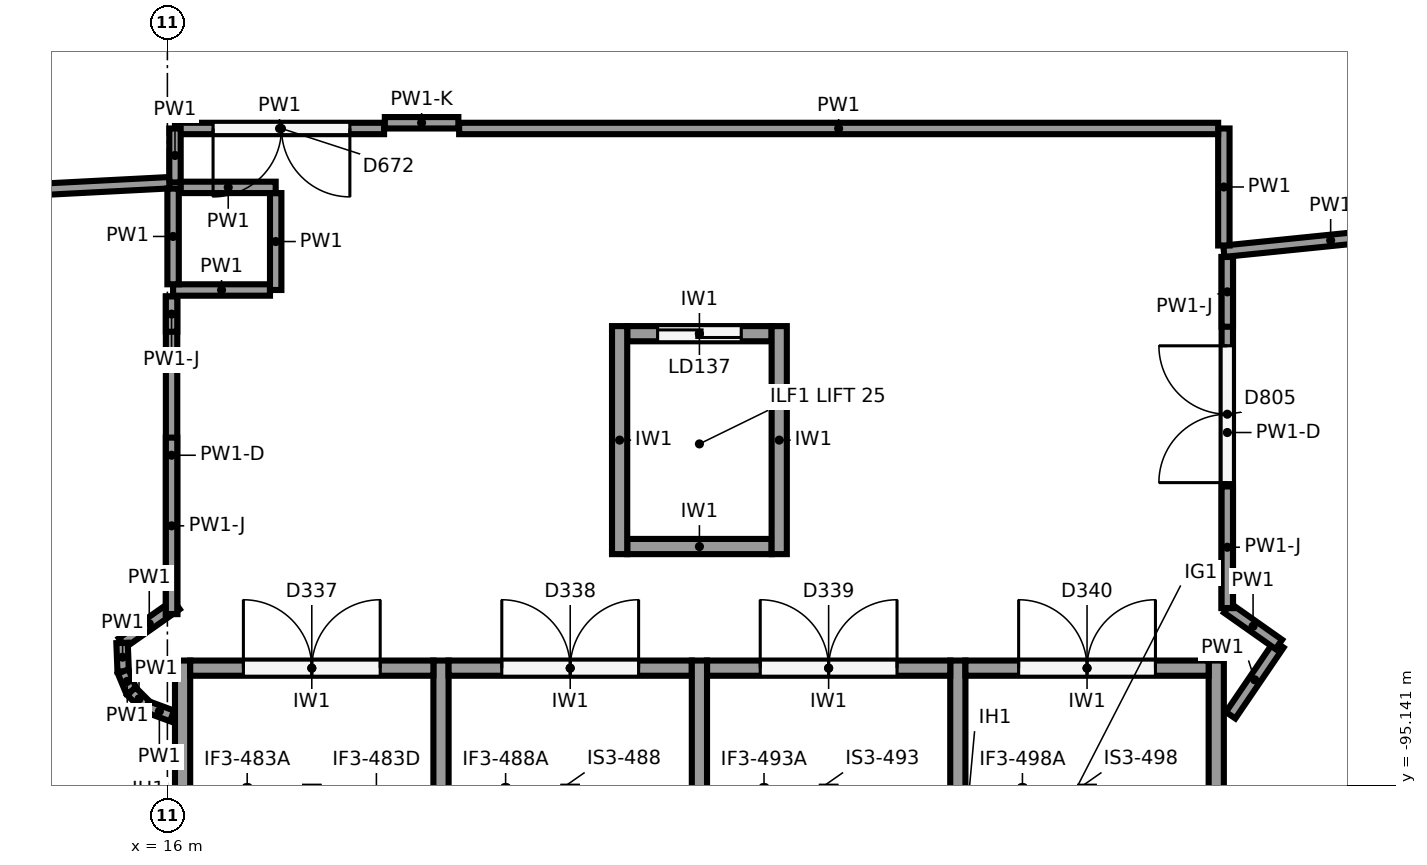
"""IFC4 building model, lengths in metres.
Left out: names, types, materials, properties, quantities, classifications, styles, units other than length and angle.
Written with IfcOpenShell. Run it as: python <this file> out.ifc"""

import sys

from ifc_helpers import new_model, si_unit, direction, frame, frame_2d, origin, origin_2d, place, context, subcontext, project, spatial, rectangle, circle, extrude, element, fill, save


model = new_model("IFC4")
c1 = context("Model", 3, precision=1e-05, world=origin(), true_north=direction((0.0, 1.0)))
c2 = subcontext(c1, "Body", "Model", "MODEL_VIEW")
j1 = project(units=[si_unit("LENGTHUNIT", "METRE"), si_unit("PLANEANGLEUNIT", "RADIAN")], contexts=[c1])
p1 = place(None, origin())
s1 = spatial("IfcSite", under=j1, at=p1, CompositionType="ELEMENT")
p2 = place(p1, origin())
s2 = spatial("IfcBuilding", under=s1, at=p2, CompositionType="ELEMENT")
p3 = place(p2, frame((0.0, 0.0, 6.5)))
s3 = spatial("IfcBuildingStorey", under=s2, at=p3, CompositionType="ELEMENT", Elevation=6.5)
p4 = place(p3, frame((19.119, -85.698, 0.0), z_axis=(0.0, 0.0, 1.0), x_axis=(1.0, 0.0, 0.0)))
e1 = element("IfcColumn", 1, at=p4, inside=s3, PredefinedType="COLUMN", context=c2, shape_type="SweptSolid", body=[
    extrude(circle(Radius=0.4, at=origin_2d()), origin(), (0.0, 0.0, 1.0), 5.5),
])
p5 = place(p3, frame((19.627, -89.904, 0.0), z_axis=(0.0, 0.0, 1.0), x_axis=(1.0, 0.0, 0.0)))
e2 = element("IfcColumn", 2, at=p5, inside=s3, PredefinedType="COLUMN", context=c2, shape_type="SweptSolid", body=[
    extrude(circle(Radius=0.55, at=origin_2d()), origin(), (0.0, 0.0, 1.0), 5.5),
])
p6 = place(p3, frame((31.737, -85.377, 0.0), z_axis=(0.0, 0.0, 1.0), x_axis=(1.0, 0.0, 0.0)))
e3 = element("IfcColumn", 3, at=p6, inside=s3, PredefinedType="COLUMN", context=c2, shape_type="SweptSolid", body=[
    extrude(circle(Radius=0.4, at=origin_2d()), origin(), (0.0, 0.0, 1.0), 5.5),
])
for number, where, z_axis, x_axis in (
    (4, (16.2, -102.3, 0.0), (0.0, 0.0, 1.0), (0.0, 1.0, 0.0)),
    (5, (23.0, -102.3, 0.0), (0.0, 0.0, 1.0), (0.0, 1.0, 0.0)),
    (6, (29.8, -102.3, 0.0), (0.0, 0.0, 1.0), (0.0, 1.0, 0.0)),
    (7, (19.6, -102.3, 0.0), (0.0, 0.0, 1.0), (0.0, 1.0, 0.0)),
    (8, (26.4, -102.3, 0.0), (0.0, 0.0, 1.0), (0.0, 1.0, 0.0)),
):
    element("IfcWall", number, at=place(p3, frame(where, z_axis=z_axis, x_axis=x_axis)), inside=s3, PredefinedType="SHEAR", context=c2, shape_type="SweptSolid", body=[
        extrude(rectangle(XDim=8.8, YDim=0.2, at=frame_2d((4.4, 0.0))), origin(), (0.0, 0.0, 1.0), 5.15),
    ])
p7 = place(p3, frame((16.3, -93.6, 0.0), z_axis=(0.0, 0.0, 1.0), x_axis=(1.0, 0.0, 0.0)))
e9 = element("IfcWall", 9, at=p7, inside=s3, PredefinedType="SHEAR", context=c2, shape_type="SweptSolid", body=[
    extrude(rectangle(XDim=3.2, YDim=0.2, at=frame_2d((1.6, 0.0))), origin(), (0.0, 0.0, 1.0), 5.15),
])
p8 = place(p7, frame((0.7, 0.0, 0.0)))
e10 = element("IfcOpeningElement", 10, at=p8, cuts=e9, PredefinedType="OPENING", context=c2, shape_type="SweptSolid", body=[
    extrude(rectangle(XDim=1.8, YDim=2.1, at=frame_2d((0.9, 1.05))), frame((0.0, 0.11, 0.0), z_axis=(0.0, -1.0, 0.0), x_axis=(1.0, 0.0, 0.0)), (0.0, 0.0, 1.0), 0.22),
])
p9 = place(p3, frame((19.7, -93.6, 0.0), z_axis=(0.0, 0.0, 1.0), x_axis=(1.0, 0.0, 0.0)))
e11 = element("IfcWall", 11, at=p9, inside=s3, PredefinedType="SHEAR", context=c2, shape_type="SweptSolid", body=[
    extrude(rectangle(XDim=3.2, YDim=0.2, at=frame_2d((1.6, 0.0))), origin(), (0.0, 0.0, 1.0), 5.15),
])
p10 = place(p9, frame((0.7, 0.0, 0.0)))
e12 = element("IfcOpeningElement", 12, at=p10, cuts=e11, PredefinedType="OPENING", context=c2, shape_type="SweptSolid", body=[
    extrude(rectangle(XDim=1.8, YDim=2.1, at=frame_2d((0.9, 1.05))), frame((0.0, 0.11, 0.0), z_axis=(0.0, -1.0, 0.0), x_axis=(1.0, 0.0, 0.0)), (0.0, 0.0, 1.0), 0.22),
])
p11 = place(p3, frame((23.1, -93.6, 0.0), z_axis=(0.0, 0.0, 1.0), x_axis=(1.0, 0.0, 0.0)))
e13 = element("IfcWall", 13, at=p11, inside=s3, PredefinedType="SHEAR", context=c2, shape_type="SweptSolid", body=[
    extrude(rectangle(XDim=3.2, YDim=0.2, at=frame_2d((1.6, 0.0))), origin(), (0.0, 0.0, 1.0), 5.15),
])
p12 = place(p11, frame((0.7, 0.0, 0.0)))
e14 = element("IfcOpeningElement", 14, at=p12, cuts=e13, PredefinedType="OPENING", context=c2, shape_type="SweptSolid", body=[
    extrude(rectangle(XDim=1.8, YDim=2.1, at=frame_2d((0.9, 1.05))), frame((0.0, 0.11, 0.0), z_axis=(0.0, -1.0, 0.0), x_axis=(1.0, 0.0, 0.0)), (0.0, 0.0, 1.0), 0.22),
])
p13 = place(p3, frame((26.5, -93.6, 0.0), z_axis=(0.0, 0.0, 1.0), x_axis=(1.0, 0.0, 0.0)))
e15 = element("IfcWall", 15, at=p13, inside=s3, PredefinedType="SHEAR", context=c2, shape_type="SweptSolid", body=[
    extrude(rectangle(XDim=3.2, YDim=0.2, at=frame_2d((1.6, 0.0))), origin(), (0.0, 0.0, 1.0), 5.15),
])
p14 = place(p13, frame((0.7, 0.0, 0.0)))
e16 = element("IfcOpeningElement", 16, at=p14, cuts=e15, PredefinedType="OPENING", context=c2, shape_type="SweptSolid", body=[
    extrude(rectangle(XDim=1.8, YDim=2.1, at=frame_2d((0.9, 1.05))), frame((0.0, 0.11, 0.0), z_axis=(0.0, -1.0, 0.0), x_axis=(1.0, 0.0, 0.0)), (0.0, 0.0, 1.0), 0.22),
])
for number, where, z_axis, x_axis in (
    (17, (21.95, -92.1, 0.0), (0.0, 0.0, 1.0), (0.0, 1.0, 0.0)),
    (18, (24.05, -92.1, 0.0), (0.0, 0.0, 1.0), (0.0, 1.0, 0.0)),
):
    element("IfcWall", number, at=place(p3, frame(where, z_axis=z_axis, x_axis=x_axis)), inside=s3, PredefinedType="SHEAR", context=c2, shape_type="SweptSolid", body=[
        extrude(rectangle(XDim=3.0, YDim=0.2, at=frame_2d((1.5, 0.0))), origin(), (0.0, 0.0, 1.0), 5.15),
    ])
p15 = place(p3, frame((22.05, -92.0, 0.0), z_axis=(0.0, 0.0, 1.0), x_axis=(1.0, 0.0, 0.0)))
e19 = element("IfcWall", 19, at=p15, inside=s3, PredefinedType="SHEAR", context=c2, shape_type="SweptSolid", body=[
    extrude(rectangle(XDim=1.9, YDim=0.2, at=frame_2d((0.95, 0.0))), origin(), (0.0, 0.0, 1.0), 5.15),
])
p16 = place(p3, frame((22.05, -89.2, 0.0), z_axis=(0.0, 0.0, 1.0), x_axis=(1.0, 0.0, 0.0)))
e20 = element("IfcWall", 20, at=p16, inside=s3, PredefinedType="SHEAR", context=c2, shape_type="SweptSolid", body=[
    extrude(rectangle(XDim=1.9, YDim=0.2, at=frame_2d((0.95, 0.0))), origin(), (0.0, 0.0, 1.0), 5.15),
])
p17 = place(p16, frame((0.4, 0.0, 0.0)))
e21 = element("IfcOpeningElement", 21, at=p17, cuts=e20, PredefinedType="OPENING", context=c2, shape_type="SweptSolid", body=[
    extrude(rectangle(XDim=1.1, YDim=2.1, at=frame_2d((0.55, 1.05))), frame((0.0, 0.11, 0.0), z_axis=(0.0, -1.0, 0.0), x_axis=(1.0, 0.0, 0.0)), (0.0, 0.0, 1.0), 0.22),
])
p18 = place(p3, frame((18.851, -86.5, 0.0), z_axis=(0.0, 0.0, 1.0), x_axis=(-1.0, 0.0, 0.0)))
e22 = element("IfcWall", 22, at=p18, inside=s3, PredefinedType="PARTITIONING", context=c2, shape_type="SweptSolid", body=[
    extrude(rectangle(XDim=2.751, YDim=0.15, at=frame_2d((1.375, 0.0))), origin(), (0.0, 0.0, 1.0), 5.15),
])
p19 = place(p18, frame((0.45, 0.0, 0.0)))
e23 = element("IfcOpeningElement", 23, at=p19, cuts=e22, PredefinedType="OPENING", context=c2, shape_type="SweptSolid", body=[
    extrude(rectangle(XDim=1.8, YDim=2.1, at=frame_2d((0.9, 1.05))), frame((0.0, 0.085, 0.0), z_axis=(0.0, -1.0, 0.0), x_axis=(1.0, 0.0, 0.0)), (0.0, 0.0, 1.0), 0.17),
])
p20 = place(p3, frame((16.1, -86.5, 0.0), z_axis=(0.0, 0.0, 1.0), x_axis=(0.0, -1.0, 0.0)))
e24 = element("IfcWall", 24, at=p20, inside=s3, PredefinedType="PARTITIONING", context=c2, shape_type="SweptSolid", body=[
    extrude(rectangle(XDim=0.71, YDim=0.15, at=frame_2d((0.355, 0.0))), origin(), (0.0, 0.0, 1.0), 5.15),
])
p21 = place(p3, frame((16.025, -87.214, 0.0), z_axis=(0.0, 0.0, 1.0), x_axis=(-0.998660530851, -0.051741126006, 0.0)))
e25 = element("IfcWall", 25, at=p21, inside=s3, PredefinedType="PARTITIONING", context=c2, shape_type="SweptSolid", body=[
    extrude(rectangle(XDim=9.027, YDim=0.15, at=frame_2d((4.513, 0.0))), origin(), (0.0, 0.0, 1.0), 5.15),
])
p22 = place(p3, frame((32.71, -87.83, 0.0), z_axis=(0.0, 0.0, 1.0), x_axis=(-0.994882835279, -0.101035360476, 0.0)))
e26 = element("IfcWall", 26, at=p22, inside=s3, PredefinedType="PARTITIONING", context=c2, shape_type="SweptSolid", body=[
    extrude(rectangle(XDim=2.825, YDim=0.15, at=frame_2d((1.412, 0.0))), origin(), (0.0, 0.0, 1.0), 5.15),
])
p23 = place(p3, frame((29.9, -88.04, 0.0), z_axis=(0.0, 0.0, 1.0), x_axis=(0.0, 1.0, 0.0)))
e27 = element("IfcWall", 27, at=p23, inside=s3, PredefinedType="PARTITIONING", context=c2, shape_type="SweptSolid", body=[
    extrude(rectangle(XDim=1.54, YDim=0.15, at=frame_2d((0.77, 0.0))), origin(), (0.0, 0.0, 1.0), 5.15),
])
p24 = place(p3, frame((29.825, -86.5, 0.0), z_axis=(0.0, 0.0, 1.0), x_axis=(-1.0, 0.0, 0.0)))
e28 = element("IfcWall", 28, at=p24, inside=s3, PredefinedType="PARTITIONING", context=c2, shape_type="SweptSolid", body=[
    extrude(rectangle(XDim=9.986, YDim=0.15, at=frame_2d((4.993, 0.0))), origin(), (0.0, 0.0, 1.0), 5.15),
])
p25 = place(p3, frame((16.075, -88.625, 0.0), z_axis=(0.0, 0.0, 1.0), x_axis=(1.0, 0.0, 0.0)))
e29 = element("IfcWall", 29, at=p25, inside=s3, PredefinedType="PARTITIONING", context=c2, shape_type="SweptSolid", body=[
    extrude(rectangle(XDim=1.275, YDim=0.15, at=frame_2d((0.638, 0.0))), origin(), (0.0, 0.0, 1.0), 5.15),
])
p26 = place(p3, frame((17.425, -88.625, 0.0), z_axis=(0.0, 0.0, 1.0), x_axis=(0.0, 1.0, 0.0)))
e30 = element("IfcWall", 30, at=p26, inside=s3, PredefinedType="PARTITIONING", context=c2, shape_type="SweptSolid", body=[
    extrude(rectangle(XDim=1.275, YDim=0.15, at=frame_2d((0.637, 0.0))), origin(), (0.0, 0.0, 1.0), 5.15),
])
p27 = place(p3, frame((17.425, -87.275, 0.0), z_axis=(0.0, 0.0, 1.0), x_axis=(-1.0, 0.0, 0.0)))
e31 = element("IfcWall", 31, at=p27, inside=s3, PredefinedType="PARTITIONING", context=c2, shape_type="SweptSolid", body=[
    extrude(rectangle(XDim=1.249, YDim=0.15, at=frame_2d((0.625, 0.0))), origin(), (0.0, 0.0, 1.0), 5.15),
])
p28 = place(p3, frame((16.075, -87.291, 0.0), z_axis=(0.0, 0.0, 1.0), x_axis=(0.0, -1.0, 0.0)))
e32 = element("IfcWall", 32, at=p28, inside=s3, PredefinedType="PARTITIONING", context=c2, shape_type="SweptSolid", body=[
    extrude(rectangle(XDim=1.259, YDim=0.15, at=frame_2d((0.629, 0.0))), origin(), (0.0, 0.0, 1.0), 5.15),
])
p29 = place(p3, frame((16.119, -92.764, 0.0), z_axis=(0.0, 0.0, 1.0), x_axis=(-0.817709179483, -0.575631564275, 0.0)))
e33 = element("IfcWall", 33, at=p29, inside=s3, PredefinedType="PARTITIONING", context=c2, shape_type="SweptSolid", body=[
    extrude(rectangle(XDim=0.875, YDim=0.15, at=frame_2d((0.438, 0.0))), origin(), (0.0, 0.0, 1.0), 5.15),
])
p30 = place(p3, frame((15.404, -93.268, 0.0), z_axis=(0.0, 0.0, 1.0), x_axis=(0.038982051143, -0.999239910977, 0.0)))
e34 = element("IfcWall", 34, at=p30, inside=s3, PredefinedType="PARTITIONING", context=c2, shape_type="SweptSolid", body=[
    extrude(rectangle(XDim=0.376, YDim=0.15, at=frame_2d((0.188, 0.0))), origin(), (0.0, 0.0, 1.0), 5.15),
])
p31 = place(p3, frame((15.418, -93.643, 0.0), z_axis=(0.0, 0.0, 1.0), x_axis=(0.382275228123, -0.924048510611, 0.0)))
e35 = element("IfcWall", 35, at=p31, inside=s3, PredefinedType="PARTITIONING", context=c2, shape_type="SweptSolid", body=[
    extrude(rectangle(XDim=0.282, YDim=0.15, at=frame_2d((0.141, 0.0))), origin(), (0.0, 0.0, 1.0), 5.15),
])
p32 = place(p3, frame((15.526, -93.904, 0.0), z_axis=(0.0, 0.0, 1.0), x_axis=(0.707534941396, -0.706678361564, 0.0)))
e36 = element("IfcWall", 36, at=p32, inside=s3, PredefinedType="PARTITIONING", context=c2, shape_type="SweptSolid", body=[
    extrude(rectangle(XDim=0.285, YDim=0.15, at=frame_2d((0.143, 0.0))), origin(), (0.0, 0.0, 1.0), 5.15),
])
p33 = place(p3, frame((15.728, -94.105, 0.0), z_axis=(0.0, 0.0, 1.0), x_axis=(0.937674325327, -0.347515265308, 0.0)))
e37 = element("IfcWall", 37, at=p33, inside=s3, PredefinedType="PARTITIONING", context=c2, shape_type="SweptSolid", body=[
    extrude(rectangle(XDim=0.356, YDim=0.15, at=frame_2d((0.178, 0.0))), origin(), (0.0, 0.0, 1.0), 5.15),
])
p34 = place(p3, frame((29.99, -94.22, 0.0), z_axis=(0.0, 0.0, 1.0), x_axis=(0.562570599462, 0.826749248939, 0.0)))
e38 = element("IfcWall", 38, at=p34, inside=s3, PredefinedType="PARTITIONING", context=c2, shape_type="SweptSolid", body=[
    extrude(rectangle(XDim=1.127, YDim=0.15, at=frame_2d((0.564, 0.0))), origin(), (0.0, 0.0, 1.0), 5.15),
])
p35 = place(p3, frame((30.624, -93.288, 0.0), z_axis=(0.0, 0.0, 1.0), x_axis=(-0.817334487726, 0.5761634622, 0.0)))
e39 = element("IfcWall", 39, at=p35, inside=s3, PredefinedType="PARTITIONING", context=c2, shape_type="SweptSolid", body=[
    extrude(rectangle(XDim=0.83, YDim=0.15, at=frame_2d((0.415, 0.0))), origin(), (0.0, 0.0, 1.0), 5.15),
])
p36 = place(p3, frame((29.945, -92.809, 0.0), z_axis=(0.0, 0.0, 1.0), x_axis=(5.285971e-05, 0.999999998603, 0.0)))
e40 = element("IfcWall", 40, at=p36, inside=s3, PredefinedType="PARTITIONING", context=c2, shape_type="SweptSolid", body=[
    extrude(rectangle(XDim=4.619, YDim=0.15, at=frame_2d((2.309, 0.0))), origin(), (0.0, 0.0, 1.0), 3.85),
])
p37 = place(p36, frame((1.65, 0.0, 0.0)))
e41 = element("IfcOpeningElement", 41, at=p37, cuts=e40, PredefinedType="OPENING", context=c2, shape_type="SweptSolid", body=[
    extrude(rectangle(XDim=1.8, YDim=2.1, at=frame_2d((0.9, 1.05))), frame((0.0, 0.085, 0.0), z_axis=(0.0, -1.0, 0.0), x_axis=(1.0, 0.0, 0.0)), (0.0, 0.0, 1.0), 0.17),
])
p38 = place(p3, frame((29.945, -92.809, 3.85), z_axis=(0.0, 0.0, 1.0), x_axis=(0.0, 1.0, 0.0)))
e42 = element("IfcWall", 42, at=p38, inside=s3, PredefinedType="PARTITIONING", context=c2, shape_type="SweptSolid", body=[
    extrude(rectangle(XDim=1.6, YDim=0.15, at=frame_2d((0.8, 0.0))), origin(), (0.0, 0.0, 1.0), 1.3),
])
p39 = place(p3, frame((29.945, -89.108, 3.85), z_axis=(0.0, 0.0, 1.0), x_axis=(0.00026602819, 0.999999964615, 0.0)))
e43 = element("IfcWall", 43, at=p39, inside=s3, PredefinedType="PARTITIONING", context=c2, shape_type="SweptSolid", body=[
    extrude(rectangle(XDim=0.918, YDim=0.15, at=frame_2d((0.459, 0.0))), origin(), (0.0, 0.0, 1.0), 1.3),
])
p40 = place(p3, frame((19.829, -86.425, 0.0), z_axis=(0.0, 0.0, 1.0), x_axis=(-1.0, 0.0, 0.0)))
e44 = element("IfcWall", 44, at=p40, inside=s3, PredefinedType="PARTITIONING", context=c2, shape_type="SweptSolid", body=[
    extrude(rectangle(XDim=0.968, YDim=0.15, at=frame_2d((0.484, 0.0))), origin(), (0.0, 0.0, 1.0), 4.4),
])
p41 = place(p3, frame((16.055, -88.71, 0.0), z_axis=(0.0, 0.0, 1.0), x_axis=(0.0, -1.0, 0.0)))
e45 = element("IfcWall", 45, at=p41, inside=s3, PredefinedType="PARTITIONING", context=c2, shape_type="SweptSolid", body=[
    extrude(rectangle(XDim=4.178, YDim=0.15, at=frame_2d((2.089, 0.0))), origin(), (0.0, 0.0, 1.0), 3.85),
])
p42 = place(p3, frame((16.055, -88.71, 3.85), z_axis=(0.0, 0.0, 1.0), x_axis=(0.0, -1.0, 0.0)))
e46 = element("IfcWall", 46, at=p42, inside=s3, PredefinedType="PARTITIONING", context=c2, shape_type="SweptSolid", body=[
    extrude(rectangle(XDim=0.464, YDim=0.15, at=frame_2d((0.232, 0.0))), origin(), (0.0, 0.0, 1.0), 1.3),
])
p43 = place(p3, frame((16.055, -90.567, 3.85), z_axis=(0.0, 0.0, 1.0), x_axis=(0.0, -1.0, 0.0)))
e47 = element("IfcWall", 47, at=p43, inside=s3, PredefinedType="PARTITIONING", context=c2, shape_type="SweptSolid", body=[
    extrude(rectangle(XDim=2.321, YDim=0.15, at=frame_2d((1.161, 0.0))), origin(), (0.0, 0.0, 1.0), 1.3),
])
p44 = place(p8, origin())
e48 = element("IfcDoor", 48, at=p44, inside=s3, OperationType="DOUBLE_DOOR_SINGLE_SWING", PredefinedType="DOOR", context=c2, shape_type="SweptSolid", body=[
    extrude(rectangle(XDim=1.8, YDim=2.1, at=frame_2d((0.9, 1.05))), frame((0.0, 0.025, 0.0), z_axis=(0.0, -1.0, 0.0), x_axis=(1.0, 0.0, 0.0)), (0.0, 0.0, 1.0), 0.05),
])
fill(e10, e48)
p45 = place(p10, origin())
e49 = element("IfcDoor", 49, at=p45, inside=s3, OperationType="DOUBLE_DOOR_SINGLE_SWING", PredefinedType="DOOR", context=c2, shape_type="SweptSolid", body=[
    extrude(rectangle(XDim=1.8, YDim=2.1, at=frame_2d((0.9, 1.05))), frame((0.0, 0.025, 0.0), z_axis=(0.0, -1.0, 0.0), x_axis=(1.0, 0.0, 0.0)), (0.0, 0.0, 1.0), 0.05),
])
fill(e12, e49)
p46 = place(p12, origin())
e50 = element("IfcDoor", 50, at=p46, inside=s3, OperationType="DOUBLE_DOOR_SINGLE_SWING", PredefinedType="DOOR", context=c2, shape_type="SweptSolid", body=[
    extrude(rectangle(XDim=1.8, YDim=2.1, at=frame_2d((0.9, 1.05))), frame((0.0, 0.025, 0.0), z_axis=(0.0, -1.0, 0.0), x_axis=(1.0, 0.0, 0.0)), (0.0, 0.0, 1.0), 0.05),
])
fill(e14, e50)
p47 = place(p14, origin())
e51 = element("IfcDoor", 51, at=p47, inside=s3, OperationType="DOUBLE_DOOR_SINGLE_SWING", PredefinedType="DOOR", context=c2, shape_type="SweptSolid", body=[
    extrude(rectangle(XDim=1.8, YDim=2.1, at=frame_2d((0.9, 1.05))), frame((0.0, 0.025, 0.0), z_axis=(0.0, -1.0, 0.0), x_axis=(1.0, 0.0, 0.0)), (0.0, 0.0, 1.0), 0.05),
])
fill(e16, e51)
p48 = place(p17, origin())
e52 = element("IfcDoor", 52, at=p48, inside=s3, OperationType="SLIDING_TO_LEFT", PredefinedType="DOOR", context=c2, shape_type="SweptSolid", body=[
    extrude(rectangle(XDim=1.1, YDim=2.1, at=frame_2d((0.55, 1.05))), frame((0.0, 0.025, 0.0), z_axis=(0.0, -1.0, 0.0), x_axis=(1.0, 0.0, 0.0)), (0.0, 0.0, 1.0), 0.05),
])
fill(e21, e52)
p49 = place(p19, origin())
e53 = element("IfcDoor", 53, at=p49, inside=s3, OperationType="DOUBLE_DOOR_SINGLE_SWING", PredefinedType="DOOR", context=c2, shape_type="SweptSolid", body=[
    extrude(rectangle(XDim=1.8, YDim=2.1, at=frame_2d((0.9, 1.05))), frame((0.0, 0.025, 0.0), z_axis=(0.0, -1.0, 0.0), x_axis=(1.0, 0.0, 0.0)), (0.0, 0.0, 1.0), 0.05),
])
fill(e23, e53)
p50 = place(p37, origin())
e54 = element("IfcDoor", 54, at=p50, inside=s3, OperationType="DOUBLE_DOOR_SINGLE_SWING", PredefinedType="DOOR", context=c2, shape_type="SweptSolid", body=[
    extrude(rectangle(XDim=1.8, YDim=2.1, at=frame_2d((0.9, 1.05))), frame((0.0, 0.025, 0.0), z_axis=(0.0, -1.0, 0.0), x_axis=(1.0, 0.0, 0.0)), (0.0, 0.0, 1.0), 0.05),
])
fill(e41, e54)
save(model, sys.argv[1])
